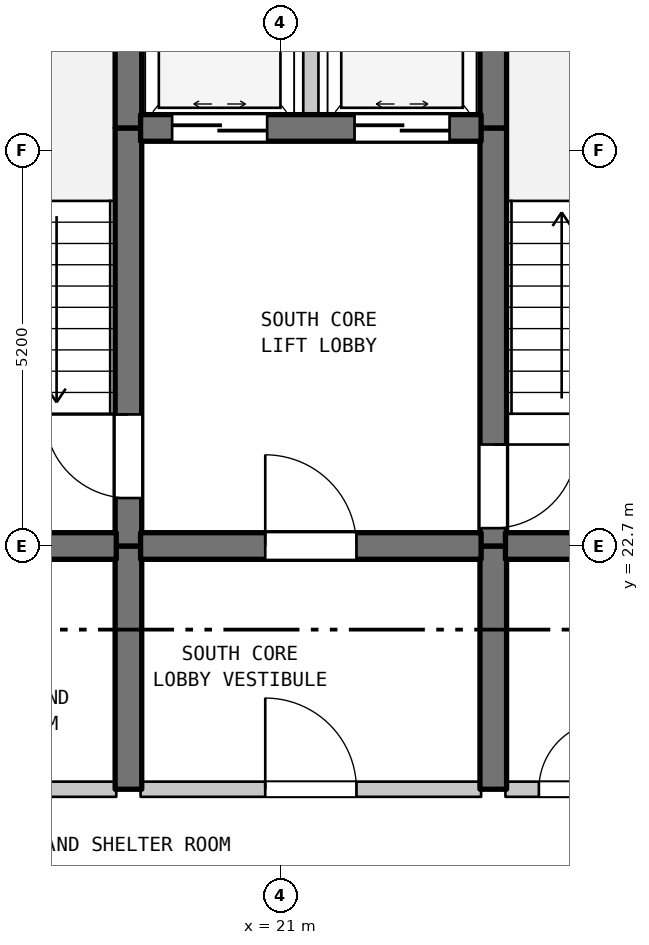
"""IFC4 building model, lengths in metres.
Left out: names, types, materials, properties, quantities, classifications, styles, units other than length and angle.
Written with IfcOpenShell. Run it as: python <this file> out.ifc"""

import sys

from ifc_helpers import new_model, si_unit, direction, frame, frame_2d, origin, place, context, subcontext, project, spatial, rectangle, extrude, element, fill, save


model = new_model("IFC4")
c1 = context("Model", 3, precision=1e-05, world=origin(), true_north=direction((0.0, 1.0)))
c2 = subcontext(c1, "Body", "Model", "MODEL_VIEW")
j1 = project(units=[si_unit("LENGTHUNIT", "METRE"), si_unit("PLANEANGLEUNIT", "RADIAN")], contexts=[c1])
p1 = place(None, origin())
s1 = spatial("IfcSite", under=j1, at=p1, CompositionType="ELEMENT")
p2 = place(p1, origin())
s2 = spatial("IfcBuilding", under=s1, at=p2, CompositionType="ELEMENT")
p3 = place(p2, frame((0.0, 0.0, 176.5)))
s3 = spatial("IfcBuildingStorey", under=s2, at=p3, CompositionType="ELEMENT", Elevation=176.5)
p4 = place(p3, frame((19.0, 19.5, 0.0), z_axis=(0.0, 0.0, 1.0), x_axis=(0.0, 1.0, 0.0)))
e1 = element("IfcWall", 1, at=p4, inside=s3, PredefinedType="SHEAR", context=c2, shape_type="SweptSolid", body=[
    extrude(rectangle(XDim=3.2, YDim=0.35, at=frame_2d((1.6, 0.0))), origin(), (0.0, 0.0, 1.0), 3.39),
])
p5 = place(p3, frame((19.0, 22.7, 0.0), z_axis=(0.0, 0.0, 1.0), x_axis=(0.0, 1.0, 0.0)))
e2 = element("IfcWall", 2, at=p5, inside=s3, PredefinedType="SHEAR", context=c2, shape_type="SweptSolid", body=[
    extrude(rectangle(XDim=5.5, YDim=0.35, at=frame_2d((2.75, 0.0))), origin(), (0.0, 0.0, 1.0), 3.39),
])
p6 = place(p5, frame((0.631, 0.0, 0.0)))
e3 = element("IfcOpeningElement", 3, at=p6, cuts=e2, PredefinedType="OPENING", context=c2, shape_type="SweptSolid", body=[
    extrude(rectangle(XDim=1.1, YDim=2.15, at=frame_2d((0.55, 1.075))), frame((0.0, 0.185, 0.0), z_axis=(0.0, -1.0, 0.0), x_axis=(1.0, 0.0, 0.0)), (0.0, 0.0, 1.0), 0.37),
])
p7 = place(p3, frame((19.0, 28.2, 0.0), z_axis=(0.0, 0.0, 1.0), x_axis=(0.0, 1.0, 0.0)))
e4 = element("IfcWall", 4, at=p7, inside=s3, PredefinedType="SHEAR", context=c2, shape_type="SweptSolid", body=[
    extrude(rectangle(XDim=1.3, YDim=0.35, at=frame_2d((0.65, 0.0))), origin(), (0.0, 0.0, 1.0), 3.39),
])
p8 = place(p3, frame((21.4, 28.2, 0.0), z_axis=(0.0, 0.0, 1.0), x_axis=(0.0, 1.0, 0.0)))
e5 = element("IfcWall", 5, at=p8, inside=s3, PredefinedType="STANDARD", context=c2, shape_type="SweptSolid", body=[
    extrude(rectangle(XDim=2.6, YDim=0.2, at=frame_2d((1.3, 0.0))), origin(), (0.0, 0.0, 1.0), 3.39),
])
p9 = place(p3, frame((23.8, 19.5, 0.0), z_axis=(0.0, 0.0, 1.0), x_axis=(0.0, 1.0, 0.0)))
e6 = element("IfcWall", 6, at=p9, inside=s3, PredefinedType="SHEAR", context=c2, shape_type="SweptSolid", body=[
    extrude(rectangle(XDim=3.2, YDim=0.35, at=frame_2d((1.6, 0.0))), origin(), (0.0, 0.0, 1.0), 3.39),
])
p10 = place(p3, frame((23.8, 22.7, 0.0), z_axis=(0.0, 0.0, 1.0), x_axis=(0.0, 1.0, 0.0)))
e7 = element("IfcWall", 7, at=p10, inside=s3, PredefinedType="SHEAR", context=c2, shape_type="SweptSolid", body=[
    extrude(rectangle(XDim=5.5, YDim=0.35, at=frame_2d((2.75, 0.0))), origin(), (0.0, 0.0, 1.0), 3.39),
])
p11 = place(p10, frame((0.235, 0.0, 0.0)))
e8 = element("IfcOpeningElement", 8, at=p11, cuts=e7, PredefinedType="OPENING", context=c2, shape_type="SweptSolid", body=[
    extrude(rectangle(XDim=1.1, YDim=2.15, at=frame_2d((0.55, 1.075))), frame((0.0, 0.185, 0.0), z_axis=(0.0, -1.0, 0.0), x_axis=(1.0, 0.0, 0.0)), (0.0, 0.0, 1.0), 0.37),
])
p12 = place(p3, frame((23.8, 28.2, 0.0), z_axis=(0.0, 0.0, 1.0), x_axis=(0.0, 1.0, 0.0)))
e9 = element("IfcWall", 9, at=p12, inside=s3, PredefinedType="SHEAR", context=c2, shape_type="SweptSolid", body=[
    extrude(rectangle(XDim=1.3, YDim=0.35, at=frame_2d((0.65, 0.0))), origin(), (0.0, 0.0, 1.0), 3.39),
])
p13 = place(p3, frame((15.16, 19.5, 0.0), z_axis=(0.0, 0.0, 1.0), x_axis=(1.0, 0.0, 0.0)))
e10 = element("IfcWall", 10, at=p13, inside=s3, PredefinedType="STANDARD", context=c2, shape_type="SweptSolid", body=[
    extrude(rectangle(XDim=3.68, YDim=0.2, at=frame_2d((1.84, 0.0))), origin(), (0.0, 0.0, 1.0), 3.39),
])
p14 = place(p13, frame((1.39, 0.0, 0.0)))
e11 = element("IfcOpeningElement", 11, at=p14, cuts=e10, PredefinedType="OPENING", context=c2, shape_type="SweptSolid", body=[
    extrude(rectangle(XDim=0.9, YDim=2.15, at=frame_2d((0.45, 1.075))), frame((0.0, 0.11, 0.0), z_axis=(0.0, -1.0, 0.0), x_axis=(1.0, 0.0, 0.0)), (0.0, 0.0, 1.0), 0.22),
])
p15 = place(p3, frame((19.16, 19.5, 0.0), z_axis=(0.0, 0.0, 1.0), x_axis=(1.0, 0.0, 0.0)))
e12 = element("IfcWall", 12, at=p15, inside=s3, PredefinedType="STANDARD", context=c2, shape_type="SweptSolid", body=[
    extrude(rectangle(XDim=4.48, YDim=0.2, at=frame_2d((2.24, 0.0))), origin(), (0.0, 0.0, 1.0), 3.39),
])
p16 = place(p15, frame((1.64, 0.0, 0.0)))
e13 = element("IfcOpeningElement", 13, at=p16, cuts=e12, PredefinedType="OPENING", context=c2, shape_type="SweptSolid", body=[
    extrude(rectangle(XDim=1.2, YDim=2.2, at=frame_2d((0.6, 1.1))), frame((0.0, 0.11, 0.0), z_axis=(0.0, -1.0, 0.0), x_axis=(1.0, 0.0, 0.0)), (0.0, 0.0, 1.0), 0.22),
])
p17 = place(p3, frame((23.96, 19.5, 0.0), z_axis=(0.0, 0.0, 1.0), x_axis=(1.0, 0.0, 0.0)))
e14 = element("IfcWall", 14, at=p17, inside=s3, PredefinedType="STANDARD", context=c2, shape_type="SweptSolid", body=[
    extrude(rectangle(XDim=1.855, YDim=0.2, at=frame_2d((0.927, 0.0))), origin(), (0.0, 0.0, 1.0), 3.39),
])
p18 = place(p17, frame((0.44, 0.0, 0.0)))
e15 = element("IfcOpeningElement", 15, at=p18, cuts=e14, PredefinedType="OPENING", context=c2, shape_type="SweptSolid", body=[
    extrude(rectangle(XDim=0.9, YDim=2.15, at=frame_2d((0.45, 1.075))), frame((0.0, 0.11, 0.0), z_axis=(0.0, -1.0, 0.0), x_axis=(1.0, 0.0, 0.0)), (0.0, 0.0, 1.0), 0.22),
])
p19 = place(p3, frame((15.16, 22.7, 0.0), z_axis=(0.0, 0.0, 1.0), x_axis=(1.0, 0.0, 0.0)))
e16 = element("IfcWall", 16, at=p19, inside=s3, PredefinedType="SHEAR", context=c2, shape_type="SweptSolid", body=[
    extrude(rectangle(XDim=3.68, YDim=0.35, at=frame_2d((1.84, 0.0))), origin(), (0.0, 0.0, 1.0), 3.39),
])
p20 = place(p3, frame((19.16, 22.7, 0.0), z_axis=(0.0, 0.0, 1.0), x_axis=(1.0, 0.0, 0.0)))
e17 = element("IfcWall", 17, at=p20, inside=s3, PredefinedType="SHEAR", context=c2, shape_type="SweptSolid", body=[
    extrude(rectangle(XDim=4.48, YDim=0.35, at=frame_2d((2.24, 0.0))), origin(), (0.0, 0.0, 1.0), 3.39),
])
p21 = place(p20, frame((1.64, 0.0, 0.0)))
e18 = element("IfcOpeningElement", 18, at=p21, cuts=e17, PredefinedType="OPENING", context=c2, shape_type="SweptSolid", body=[
    extrude(rectangle(XDim=1.2, YDim=2.2, at=frame_2d((0.6, 1.1))), frame((0.0, 0.185, 0.0), z_axis=(0.0, -1.0, 0.0), x_axis=(1.0, 0.0, 0.0)), (0.0, 0.0, 1.0), 0.37),
])
p22 = place(p3, frame((23.96, 22.7, 0.0), z_axis=(0.0, 0.0, 1.0), x_axis=(1.0, 0.0, 0.0)))
e19 = element("IfcWall", 19, at=p22, inside=s3, PredefinedType="SHEAR", context=c2, shape_type="SweptSolid", body=[
    extrude(rectangle(XDim=1.855, YDim=0.35, at=frame_2d((0.927, 0.0))), origin(), (0.0, 0.0, 1.0), 3.39),
])
p23 = place(p3, frame((19.16, 28.2, 0.0), z_axis=(0.0, 0.0, 1.0), x_axis=(1.0, 0.0, 0.0)))
e20 = element("IfcWall", 20, at=p23, inside=s3, PredefinedType="SHEAR", context=c2, shape_type="SweptSolid", body=[
    extrude(rectangle(XDim=4.48, YDim=0.35, at=frame_2d((2.24, 0.0))), origin(), (0.0, 0.0, 1.0), 3.39),
])
p24 = place(p23, frame((0.415, 0.0, 0.0)))
e21 = element("IfcOpeningElement", 21, at=p24, cuts=e20, PredefinedType="OPENING", context=c2, shape_type="SweptSolid", body=[
    extrude(rectangle(XDim=1.25, YDim=2.2, at=frame_2d((0.625, 1.1))), frame((0.0, 0.185, 0.0), z_axis=(0.0, -1.0, 0.0), x_axis=(1.0, 0.0, 0.0)), (0.0, 0.0, 1.0), 0.37),
])
p25 = place(p23, frame((2.815, 0.0, 0.0)))
e22 = element("IfcOpeningElement", 22, at=p25, cuts=e20, PredefinedType="OPENING", context=c2, shape_type="SweptSolid", body=[
    extrude(rectangle(XDim=1.25, YDim=2.2, at=frame_2d((0.625, 1.1))), frame((0.0, 0.185, 0.0), z_axis=(0.0, -1.0, 0.0), x_axis=(1.0, 0.0, 0.0)), (0.0, 0.0, 1.0), 0.37),
])
p26 = place(p6, origin())
e23 = element("IfcDoor", 23, at=p26, inside=s3, OperationType="SINGLE_SWING_RIGHT", PredefinedType="DOOR", context=c2, shape_type="SweptSolid", body=[
    extrude(rectangle(XDim=1.1, YDim=2.15, at=frame_2d((0.55, 1.075))), frame((0.0, 0.025, 0.0), z_axis=(0.0, -1.0, 0.0), x_axis=(1.0, 0.0, 0.0)), (0.0, 0.0, 1.0), 0.05),
])
fill(e3, e23)
p27 = place(p11, frame((1.1, 0.0, 0.0), z_axis=(0.0, 0.0, 1.0), x_axis=(-1.0, 0.0, 0.0)))
e24 = element("IfcDoor", 24, at=p27, inside=s3, OperationType="SINGLE_SWING_RIGHT", PredefinedType="DOOR", context=c2, shape_type="SweptSolid", body=[
    extrude(rectangle(XDim=1.1, YDim=2.15, at=frame_2d((0.55, 1.075))), frame((0.0, 0.025, 0.0), z_axis=(0.0, -1.0, 0.0), x_axis=(1.0, 0.0, 0.0)), (0.0, 0.0, 1.0), 0.05),
])
fill(e8, e24)
p28 = place(p16, origin())
e25 = element("IfcDoor", 25, at=p28, inside=s3, OperationType="SINGLE_SWING_LEFT", PredefinedType="DOOR", context=c2, shape_type="SweptSolid", body=[
    extrude(rectangle(XDim=1.2, YDim=2.2, at=frame_2d((0.6, 1.1))), frame((0.0, 0.025, 0.0), z_axis=(0.0, -1.0, 0.0), x_axis=(1.0, 0.0, 0.0)), (0.0, 0.0, 1.0), 0.05),
])
fill(e13, e25)
p29 = place(p18, origin())
e26 = element("IfcDoor", 26, at=p29, inside=s3, OperationType="SINGLE_SWING_RIGHT", PredefinedType="DOOR", context=c2, shape_type="SweptSolid", body=[
    extrude(rectangle(XDim=0.9, YDim=2.15, at=frame_2d((0.45, 1.075))), frame((0.0, 0.025, 0.0), z_axis=(0.0, -1.0, 0.0), x_axis=(1.0, 0.0, 0.0)), (0.0, 0.0, 1.0), 0.05),
])
fill(e15, e26)
p30 = place(p21, origin())
e27 = element("IfcDoor", 27, at=p30, inside=s3, OperationType="SINGLE_SWING_LEFT", PredefinedType="DOOR", context=c2, shape_type="SweptSolid", body=[
    extrude(rectangle(XDim=1.2, YDim=2.2, at=frame_2d((0.6, 1.1))), frame((0.0, 0.025, 0.0), z_axis=(0.0, -1.0, 0.0), x_axis=(1.0, 0.0, 0.0)), (0.0, 0.0, 1.0), 0.05),
])
fill(e18, e27)
p31 = place(p24, origin())
e28 = element("IfcDoor", 28, at=p31, inside=s3, OperationType="DOUBLE_DOOR_SLIDING", PredefinedType="DOOR", context=c2, shape_type="SweptSolid", body=[
    extrude(rectangle(XDim=1.25, YDim=2.2, at=frame_2d((0.625, 1.1))), frame((0.0, 0.025, 0.0), z_axis=(0.0, -1.0, 0.0), x_axis=(1.0, 0.0, 0.0)), (0.0, 0.0, 1.0), 0.05),
])
fill(e21, e28)
p32 = place(p25, origin())
e29 = element("IfcDoor", 29, at=p32, inside=s3, OperationType="DOUBLE_DOOR_SLIDING", PredefinedType="DOOR", context=c2, shape_type="SweptSolid", body=[
    extrude(rectangle(XDim=1.25, YDim=2.2, at=frame_2d((0.625, 1.1))), frame((0.0, 0.025, 0.0), z_axis=(0.0, -1.0, 0.0), x_axis=(1.0, 0.0, 0.0)), (0.0, 0.0, 1.0), 0.05),
])
fill(e22, e29)
save(model, sys.argv[1])
